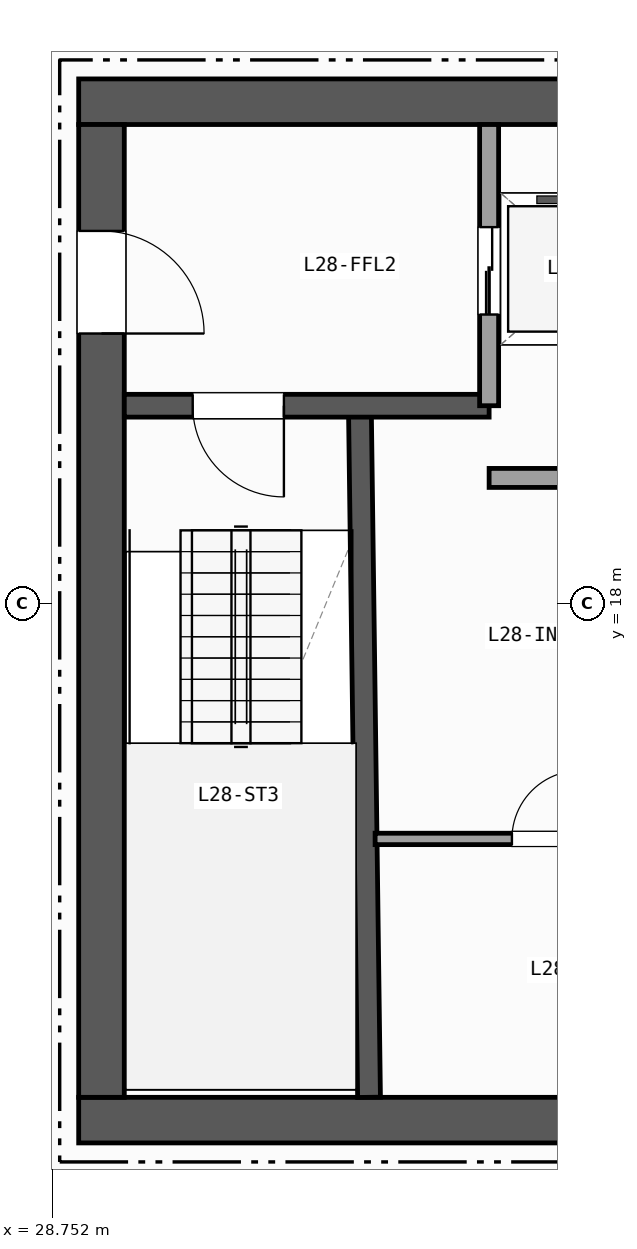
"""IFC4 building model, lengths in metres.
Left out: names, types, materials, properties, quantities, classifications, styles, units other than length and angle.
Written with IfcOpenShell. Run it as: python <this file> out.ifc"""

import sys

from ifc_helpers import new_model, si_unit, direction, frame, frame_2d, origin, place, context, subcontext, project, spatial, rectangle, extrude, element, fill, save


model = new_model("IFC4")
c1 = context("Model", 3, precision=1e-05, world=origin(), true_north=direction((0.0, 1.0)))
c2 = subcontext(c1, "Body", "Model", "MODEL_VIEW")
j1 = project(units=[si_unit("LENGTHUNIT", "METRE"), si_unit("PLANEANGLEUNIT", "RADIAN")], contexts=[c1])
p1 = place(None, origin())
s1 = spatial("IfcSite", under=j1, at=p1, CompositionType="ELEMENT")
p2 = place(p1, origin())
s2 = spatial("IfcBuilding", under=s1, at=p2, CompositionType="ELEMENT")
p3 = place(p2, frame((0.0, 0.0, 117.4)))
s3 = spatial("IfcBuildingStorey", under=s2, at=p3, CompositionType="ELEMENT", Elevation=117.4)
p4 = place(p3, frame((29.1, 11.2, 0.0), z_axis=(0.0, 0.0, 1.0), x_axis=(1.0, 0.0, 0.0)))
e1 = element("IfcWall", 1, at=p4, inside=s3, PredefinedType="SHEAR", context=c2, shape_type="SweptSolid", body=[
    extrude(rectangle(XDim=14.0, YDim=0.6, at=frame_2d((7.0, 0.0))), origin(), (0.0, 0.0, 1.0), 3.42),
])
p5 = place(p3, frame((43.1, 24.6, 0.0), z_axis=(0.0, 0.0, 1.0), x_axis=(-1.0, 0.0, 0.0)))
e2 = element("IfcWall", 2, at=p5, inside=s3, PredefinedType="SHEAR", context=c2, shape_type="SweptSolid", body=[
    extrude(rectangle(XDim=14.0, YDim=0.6, at=frame_2d((7.0, 0.0))), origin(), (0.0, 0.0, 1.0), 3.42),
])
p6 = place(p5, frame((0.8, 0.0, 0.0)))
e3 = element("IfcOpeningElement", 3, at=p6, cuts=e2, PredefinedType="OPENING", context=c2, shape_type="SweptSolid", body=[
    extrude(rectangle(XDim=1.1, YDim=2.15, at=frame_2d((0.55, 1.075))), frame((0.0, 0.31, 0.0), z_axis=(0.0, -1.0, 0.0), x_axis=(1.0, 0.0, 0.0)), (0.0, 0.0, 1.0), 0.62),
])
p7 = place(p5, frame((2.3, 0.0, 0.0)))
e4 = element("IfcOpeningElement", 4, at=p7, cuts=e2, PredefinedType="OPENING", context=c2, shape_type="SweptSolid", body=[
    extrude(rectangle(XDim=0.9, YDim=2.1, at=frame_2d((0.45, 1.05))), frame((0.0, 0.31, 0.0), z_axis=(0.0, -1.0, 0.0), x_axis=(1.0, 0.0, 0.0)), (0.0, 0.0, 1.0), 0.62),
])
p8 = place(p5, frame((3.6, 0.0, 0.0)))
e5 = element("IfcOpeningElement", 5, at=p8, cuts=e2, PredefinedType="OPENING", context=c2, shape_type="SweptSolid", body=[
    extrude(rectangle(XDim=0.9, YDim=2.1, at=frame_2d((0.45, 1.05))), frame((0.0, 0.31, 0.0), z_axis=(0.0, -1.0, 0.0), x_axis=(1.0, 0.0, 0.0)), (0.0, 0.0, 1.0), 0.62),
])
p9 = place(p5, frame((4.95, 0.0, 0.0)))
e6 = element("IfcOpeningElement", 6, at=p9, cuts=e2, PredefinedType="OPENING", context=c2, shape_type="SweptSolid", body=[
    extrude(rectangle(XDim=0.9, YDim=2.1, at=frame_2d((0.45, 1.05))), frame((0.0, 0.31, 0.0), z_axis=(0.0, -1.0, 0.0), x_axis=(1.0, 0.0, 0.0)), (0.0, 0.0, 1.0), 0.62),
])
p10 = place(p3, frame((29.4, 24.3, 0.0), z_axis=(0.0, 0.0, 1.0), x_axis=(0.0, -1.0, 0.0)))
e7 = element("IfcWall", 7, at=p10, inside=s3, PredefinedType="SHEAR", context=c2, shape_type="SweptSolid", body=[
    extrude(rectangle(XDim=12.8, YDim=0.6, at=frame_2d((6.4, 0.0))), origin(), (0.0, 0.0, 1.0), 3.42),
])
p11 = place(p10, frame((1.4, 0.0, 0.0)))
e8 = element("IfcOpeningElement", 8, at=p11, cuts=e7, PredefinedType="OPENING", context=c2, shape_type="SweptSolid", body=[
    extrude(rectangle(XDim=1.35, YDim=2.15, at=frame_2d((0.675, 1.075))), frame((0.0, 0.31, 0.0), z_axis=(0.0, -1.0, 0.0), x_axis=(1.0, 0.0, 0.0)), (0.0, 0.0, 1.0), 0.62),
])
p12 = place(p3, frame((32.92, 11.5, 0.0), z_axis=(0.0, 0.0, 1.0), x_axis=(-0.013244407292, 0.999912288991, 0.0)))
e9 = element("IfcWall", 9, at=p12, inside=s3, PredefinedType="SHEAR", context=c2, shape_type="SweptSolid", body=[
    extrude(rectangle(XDim=9.051, YDim=0.3, at=frame_2d((4.525, 0.0))), origin(), (0.0, 0.0, 1.0), 3.42),
])
p13 = place(p3, frame((34.5, 20.6, 0.0), z_axis=(0.0, 0.0, 1.0), x_axis=(-1.0, 0.0, 0.0)))
e10 = element("IfcWall", 10, at=p13, inside=s3, PredefinedType="SHEAR", context=c2, shape_type="SweptSolid", body=[
    extrude(rectangle(XDim=4.8, YDim=0.3, at=frame_2d((2.4, 0.0))), origin(), (0.0, 0.0, 1.0), 3.42),
])
p14 = place(p13, frame((2.7, 0.0, 0.0)))
e11 = element("IfcOpeningElement", 11, at=p14, cuts=e10, PredefinedType="OPENING", context=c2, shape_type="SweptSolid", body=[
    extrude(rectangle(XDim=1.2, YDim=2.15, at=frame_2d((0.6, 1.075))), frame((0.0, 0.16, 0.0), z_axis=(0.0, -1.0, 0.0), x_axis=(1.0, 0.0, 0.0)), (0.0, 0.0, 1.0), 0.32),
])
p15 = place(p3, frame((34.5, 20.6, 0.0), z_axis=(0.0, 0.0, 1.0), x_axis=(0.0, 1.0, 0.0)))
e12 = element("IfcWall", 12, at=p15, inside=s3, PredefinedType="PARTITIONING", context=c2, shape_type="SweptSolid", body=[
    extrude(rectangle(XDim=3.7, YDim=0.25, at=frame_2d((1.85, 0.0))), origin(), (0.0, 0.0, 1.0), 3.42),
])
p16 = place(p15, frame((1.2, 0.0, 0.0)))
e13 = element("IfcOpeningElement", 13, at=p16, cuts=e12, PredefinedType="OPENING", context=c2, shape_type="SweptSolid", body=[
    extrude(rectangle(XDim=1.15, YDim=2.15, at=frame_2d((0.575, 1.075))), frame((0.0, 0.135, 0.0), z_axis=(0.0, -1.0, 0.0), x_axis=(1.0, 0.0, 0.0)), (0.0, 0.0, 1.0), 0.27),
])
p17 = place(p3, frame((34.5, 19.65, 0.0), z_axis=(0.0, 0.0, 1.0), x_axis=(1.0, 0.0, 0.0)))
e14 = element("IfcWall", 14, at=p17, inside=s3, PredefinedType="PARTITIONING", context=c2, shape_type="SweptSolid", body=[
    extrude(rectangle(XDim=6.48, YDim=0.25, at=frame_2d((3.24, 0.0))), origin(), (0.0, 0.0, 1.0), 3.42),
])
p18 = place(p3, frame((33.0, 14.9, 0.0), z_axis=(0.0, 0.0, 1.0), x_axis=(1.0, 0.0, 0.0)))
e15 = element("IfcWall", 15, at=p18, inside=s3, PredefinedType="PARTITIONING", context=c2, shape_type="SweptSolid", body=[
    extrude(rectangle(XDim=5.1, YDim=0.15, at=frame_2d((2.55, 0.0))), origin(), (0.0, 0.0, 1.0), 3.42),
])
p19 = place(p18, frame((1.8, 0.0, 0.0)))
e16 = element("IfcOpeningElement", 16, at=p19, cuts=e15, PredefinedType="OPENING", context=c2, shape_type="SweptSolid", body=[
    extrude(rectangle(XDim=0.9, YDim=2.1, at=frame_2d((0.45, 1.05))), frame((0.0, 0.085, 0.0), z_axis=(0.0, -1.0, 0.0), x_axis=(1.0, 0.0, 0.0)), (0.0, 0.0, 1.0), 0.17),
])
p20 = place(p14, origin())
e17 = element("IfcDoor", 17, at=p20, inside=s3, OperationType="SINGLE_SWING_LEFT", PredefinedType="DOOR", context=c2, shape_type="SweptSolid", body=[
    extrude(rectangle(XDim=1.2, YDim=2.15, at=frame_2d((0.6, 1.075))), frame((0.0, 0.025, 0.0), z_axis=(0.0, -1.0, 0.0), x_axis=(1.0, 0.0, 0.0)), (0.0, 0.0, 1.0), 0.05),
])
fill(e11, e17)
p21 = place(p11, origin())
e18 = element("IfcDoor", 18, at=p21, inside=s3, OperationType="SINGLE_SWING_RIGHT", PredefinedType="DOOR", context=c2, shape_type="SweptSolid", body=[
    extrude(rectangle(XDim=1.35, YDim=2.15, at=frame_2d((0.675, 1.075))), frame((0.0, 0.025, 0.0), z_axis=(0.0, -1.0, 0.0), x_axis=(1.0, 0.0, 0.0)), (0.0, 0.0, 1.0), 0.05),
])
fill(e8, e18)
p22 = place(p16, origin())
e19 = element("IfcDoor", 19, at=p22, inside=s3, OperationType="DOUBLE_DOOR_SLIDING", PredefinedType="DOOR", context=c2, shape_type="SweptSolid", body=[
    extrude(rectangle(XDim=1.15, YDim=2.15, at=frame_2d((0.575, 1.075))), frame((0.0, 0.025, 0.0), z_axis=(0.0, -1.0, 0.0), x_axis=(1.0, 0.0, 0.0)), (0.0, 0.0, 1.0), 0.05),
])
fill(e13, e19)
p23 = place(p19, origin())
e20 = element("IfcDoor", 20, at=p23, inside=s3, OperationType="SINGLE_SWING_RIGHT", PredefinedType="DOOR", context=c2, shape_type="SweptSolid", body=[
    extrude(rectangle(XDim=0.9, YDim=2.1, at=frame_2d((0.45, 1.05))), frame((0.0, 0.025, 0.0), z_axis=(0.0, -1.0, 0.0), x_axis=(1.0, 0.0, 0.0)), (0.0, 0.0, 1.0), 0.05),
])
fill(e16, e20)
save(model, sys.argv[1])
